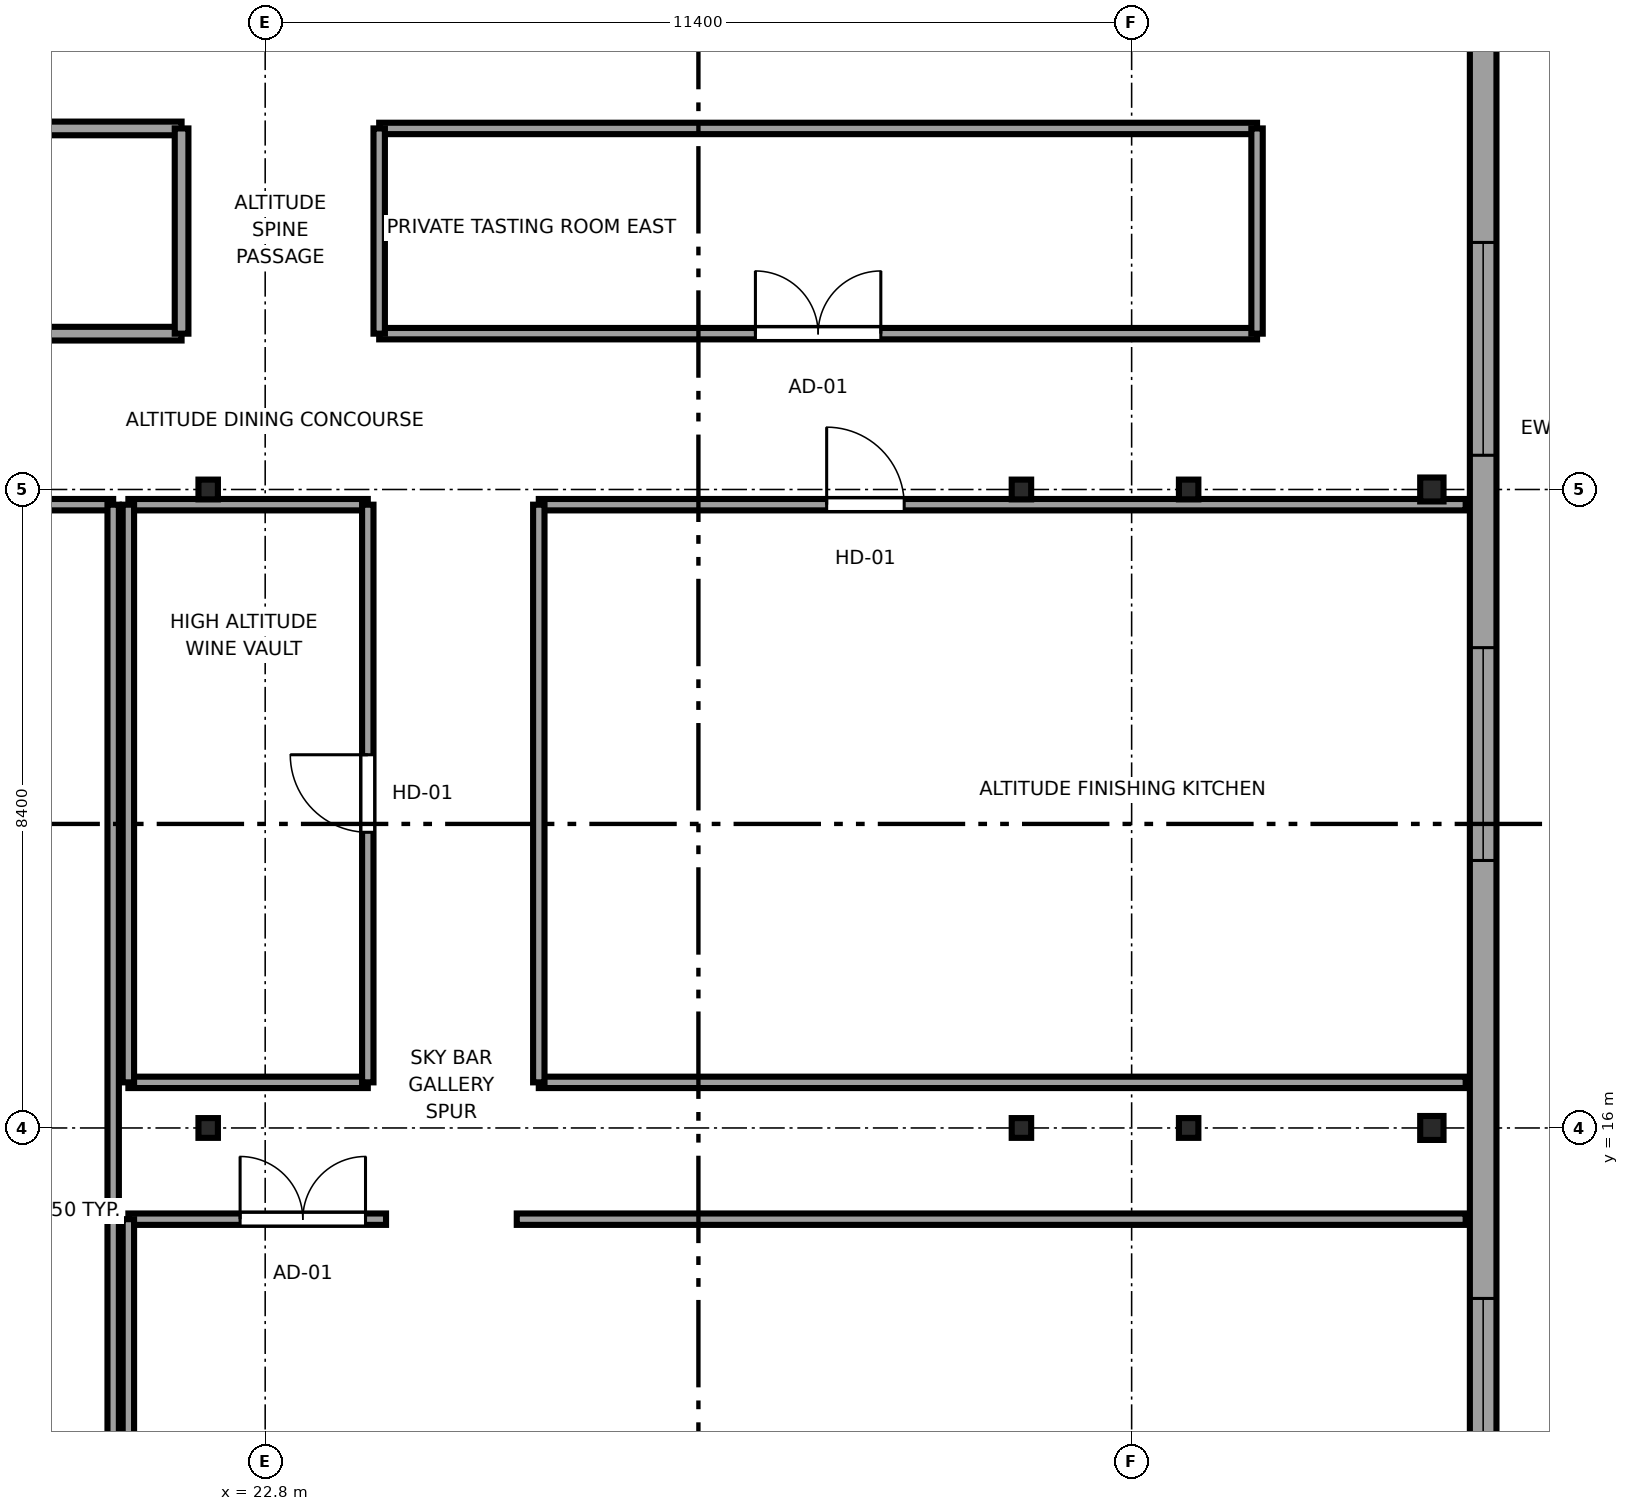
"""IFC4 building model, lengths in metres.
Left out: names, types, materials, properties, quantities, classifications, styles, units other than length and angle.
Written with IfcOpenShell. Run it as: python <this file> out.ifc"""

import sys

from ifc_helpers import new_model, si_unit, direction, frame, frame_2d, origin, origin_2d, place, context, subcontext, project, spatial, rectangle, i_section, extrude, source, transform, mapped, element, fill, save


model = new_model("IFC4")
c1 = context("Model", 3, precision=1e-05, world=origin(), true_north=direction((0.0, 1.0)))
c2 = subcontext(c1, "Body", "Model", "MODEL_VIEW")
j1 = project(units=[si_unit("LENGTHUNIT", "METRE"), si_unit("PLANEANGLEUNIT", "RADIAN")], contexts=[c1])
p1 = place(None, origin())
s1 = spatial("IfcSite", under=j1, at=p1, CompositionType="ELEMENT")
p2 = place(p1, origin())
s2 = spatial("IfcBuilding", under=s1, at=p2, CompositionType="ELEMENT")
p3 = place(p2, frame((0.0, 0.0, 286.55)))
s3 = spatial("IfcBuildingStorey", under=s2, at=p3, CompositionType="ELEMENT", Elevation=286.55)
m1 = source(origin(), c2, "Body", "SweptSolid", [
    extrude(i_section(OverallWidth=0.256, OverallDepth=0.26, WebThickness=0.01, FlangeThickness=0.017, FilletRadius=0.014, at=origin_2d()), origin(), (0.0, 0.0, 1.0), 4.4),
])
for number, where, z_axis, x_axis in (
    (1, (22.05, 16.0, 0.0), (0.0, 0.0, 1.0), (1.0, 0.0, 0.0)),
    (2, (22.05, 24.4, 0.0), (0.0, 0.0, 1.0), (1.0, 0.0, 0.0)),
    (3, (32.75, 16.0, 0.0), (0.0, 0.0, 1.0), (1.0, 0.0, 0.0)),
    (4, (32.75, 24.4, 0.0), (0.0, 0.0, 1.0), (1.0, 0.0, 0.0)),
    (5, (34.95, 16.0, 0.0), (0.0, 0.0, 1.0), (1.0, 0.0, 0.0)),
    (6, (34.95, 24.4, 0.0), (0.0, 0.0, 1.0), (1.0, 0.0, 0.0)),
):
    element("IfcColumn", number, at=place(p3, frame(where, z_axis=z_axis, x_axis=x_axis)), inside=s3, PredefinedType="COLUMN", context=c2, shape_type="MappedRepresentation", body=[
        mapped(m1, transform((0.0, 0.0, 0.0), x_axis=(1.0, 0.0, 0.0), y_axis=(0.0, 1.0, 0.0), z_axis=(0.0, 0.0, 1.0), scale=1.0)),
    ])
m2 = source(origin(), c2, "Body", "SweptSolid", [
    extrude(i_section(OverallWidth=0.307, OverallDepth=0.315, WebThickness=0.012, FlangeThickness=0.019, FilletRadius=0.017, at=origin_2d()), origin(), (0.0, 0.0, 1.0), 4.4),
])
for number, where, z_axis, x_axis in (
    (7, (38.15, 16.0, 0.0), (0.0, 0.0, 1.0), (1.0, 0.0, 0.0)),
    (8, (38.15, 24.4, 0.0), (0.0, 0.0, 1.0), (1.0, 0.0, 0.0)),
):
    element("IfcColumn", number, at=place(p3, frame(where, z_axis=z_axis, x_axis=x_axis)), inside=s3, PredefinedType="COLUMN", context=c2, shape_type="MappedRepresentation", body=[
        mapped(m2, transform((0.0, 0.0, 0.0), x_axis=(1.0, 0.0, 0.0), y_axis=(0.0, 1.0, 0.0), z_axis=(0.0, 0.0, 1.0), scale=1.0)),
    ])
p4 = place(p3, frame((38.825, 9.617, 0.0), z_axis=(0.0, 0.0, 1.0), x_axis=(0.0, 1.0, 0.0)))
e9 = element("IfcWall", 9, at=p4, inside=s3, PredefinedType="SOLIDWALL", context=c2, shape_type="SweptSolid", body=[
    extrude(rectangle(XDim=31.166, YDim=0.35, at=frame_2d((15.583, 0.0))), origin(), (0.0, 0.0, 1.0), 4.14),
])
p5 = place(p4, frame((1.34, 0.0, 0.62)))
e10 = element("IfcOpeningElement", 10, at=p5, cuts=e9, PredefinedType="OPENING", context=c2, shape_type="SweptSolid", body=[
    extrude(rectangle(XDim=2.8, YDim=2.25, at=frame_2d((1.4, 1.125))), frame((0.0, 0.185, 0.0), z_axis=(0.0, -1.0, 0.0), x_axis=(1.0, 0.0, 0.0)), (0.0, 0.0, 1.0), 0.37),
])
p6 = place(p4, frame((9.902, 0.0, 0.62)))
e11 = element("IfcOpeningElement", 11, at=p6, cuts=e9, PredefinedType="OPENING", context=c2, shape_type="SweptSolid", body=[
    extrude(rectangle(XDim=2.8, YDim=2.25, at=frame_2d((1.4, 1.125))), frame((0.0, 0.185, 0.0), z_axis=(0.0, -1.0, 0.0), x_axis=(1.0, 0.0, 0.0)), (0.0, 0.0, 1.0), 0.37),
])
p7 = place(p4, frame((15.233, 0.0, 0.62)))
e12 = element("IfcOpeningElement", 12, at=p7, cuts=e9, PredefinedType="OPENING", context=c2, shape_type="SweptSolid", body=[
    extrude(rectangle(XDim=2.8, YDim=2.25, at=frame_2d((1.4, 1.125))), frame((0.0, 0.185, 0.0), z_axis=(0.0, -1.0, 0.0), x_axis=(1.0, 0.0, 0.0)), (0.0, 0.0, 1.0), 0.37),
])
p8 = place(p4, frame((22.744, 0.0, 0.62)))
e13 = element("IfcOpeningElement", 13, at=p8, cuts=e9, PredefinedType="OPENING", context=c2, shape_type="SweptSolid", body=[
    extrude(rectangle(XDim=2.8, YDim=2.25, at=frame_2d((1.4, 1.125))), frame((0.0, 0.185, 0.0), z_axis=(0.0, -1.0, 0.0), x_axis=(1.0, 0.0, 0.0)), (0.0, 0.0, 1.0), 0.37),
])
p9 = place(p4, frame((27.025, 0.0, 0.62)))
e14 = element("IfcOpeningElement", 14, at=p9, cuts=e9, PredefinedType="OPENING", context=c2, shape_type="SweptSolid", body=[
    extrude(rectangle(XDim=2.8, YDim=2.25, at=frame_2d((1.4, 1.125))), frame((0.0, 0.185, 0.0), z_axis=(0.0, -1.0, 0.0), x_axis=(1.0, 0.0, 0.0)), (0.0, 0.0, 1.0), 0.37),
])
p10 = place(p3, frame((10.0, 26.45, 0.0), z_axis=(0.0, 0.0, 1.0), x_axis=(1.0, 0.0, 0.0)))
e15 = element("IfcWall", 15, at=p10, inside=s3, PredefinedType="PARTITIONING", context=c2, shape_type="SweptSolid", body=[
    extrude(rectangle(XDim=11.7, YDim=0.18, at=frame_2d((5.85, 0.0))), origin(), (0.0, 0.0, 1.0), 4.14),
])
p11 = place(p10, frame((5.025, 0.0, 0.0)))
e16 = element("IfcOpeningElement", 16, at=p11, cuts=e15, PredefinedType="OPENING", context=c2, shape_type="SweptSolid", body=[
    extrude(rectangle(XDim=1.65, YDim=2.15, at=frame_2d((0.825, 1.075))), frame((0.0, 0.1, 0.0), z_axis=(0.0, -1.0, 0.0), x_axis=(1.0, 0.0, 0.0)), (0.0, 0.0, 1.0), 0.2),
])
p12 = place(p3, frame((10.0, 29.15, 0.0), z_axis=(0.0, 0.0, 1.0), x_axis=(1.0, 0.0, 0.0)))
e17 = element("IfcWall", 17, at=p12, inside=s3, PredefinedType="PARTITIONING", context=c2, shape_type="SweptSolid", body=[
    extrude(rectangle(XDim=11.7, YDim=0.18, at=frame_2d((5.85, 0.0))), origin(), (0.0, 0.0, 1.0), 4.14),
])
p13 = place(p3, frame((21.7, 26.45, 0.0), z_axis=(0.0, 0.0, 1.0), x_axis=(0.0, 1.0, 0.0)))
e18 = element("IfcWall", 18, at=p13, inside=s3, PredefinedType="PARTITIONING", context=c2, shape_type="SweptSolid", body=[
    extrude(rectangle(XDim=2.7, YDim=0.18, at=frame_2d((1.35, 0.0))), origin(), (0.0, 0.0, 1.0), 4.14),
])
p14 = place(p3, frame((24.3, 26.45, 0.0), z_axis=(0.0, 0.0, 1.0), x_axis=(1.0, 0.0, 0.0)))
e19 = element("IfcWall", 19, at=p14, inside=s3, PredefinedType="PARTITIONING", context=c2, shape_type="SweptSolid", body=[
    extrude(rectangle(XDim=11.55, YDim=0.15, at=frame_2d((5.775, 0.0))), origin(), (0.0, 0.0, 1.0), 4.14),
])
p15 = place(p14, frame((4.95, 0.0, 0.0)))
e20 = element("IfcOpeningElement", 20, at=p15, cuts=e19, PredefinedType="OPENING", context=c2, shape_type="SweptSolid", body=[
    extrude(rectangle(XDim=1.65, YDim=2.15, at=frame_2d((0.825, 1.075))), frame((0.0, 0.085, 0.0), z_axis=(0.0, -1.0, 0.0), x_axis=(1.0, 0.0, 0.0)), (0.0, 0.0, 1.0), 0.17),
])
p16 = place(p3, frame((24.3, 29.15, 0.0), z_axis=(0.0, 0.0, 1.0), x_axis=(1.0, 0.0, 0.0)))
e21 = element("IfcWall", 21, at=p16, inside=s3, PredefinedType="PARTITIONING", context=c2, shape_type="SweptSolid", body=[
    extrude(rectangle(XDim=11.55, YDim=0.15, at=frame_2d((5.775, 0.0))), origin(), (0.0, 0.0, 1.0), 4.14),
])
for number, where, z_axis, x_axis in (
    (22, (24.3, 26.45, 0.0), (0.0, 0.0, 1.0), (0.0, 1.0, 0.0)),
    (23, (35.85, 26.45, 0.0), (0.0, 0.0, 1.0), (0.0, 1.0, 0.0)),
):
    element("IfcWall", number, at=place(p3, frame(where, z_axis=z_axis, x_axis=x_axis)), inside=s3, PredefinedType="PARTITIONING", context=c2, shape_type="SweptSolid", body=[
        extrude(rectangle(XDim=2.7, YDim=0.15, at=frame_2d((1.35, 0.0))), origin(), (0.0, 0.0, 1.0), 4.14),
    ])
p17 = place(p3, frame((3.005, 24.2, 0.0), z_axis=(0.0, 0.0, 1.0), x_axis=(1.0, 0.0, 0.0)))
e24 = element("IfcWall", 24, at=p17, inside=s3, PredefinedType="PARTITIONING", context=c2, shape_type="SweptSolid", body=[
    extrude(rectangle(XDim=17.795, YDim=0.15, at=frame_2d((8.897, 0.0))), origin(), (0.0, 0.0, 1.0), 2.93),
])
p18 = place(p17, frame((8.073, 0.0, 0.0)))
e25 = element("IfcOpeningElement", 25, at=p18, cuts=e24, PredefinedType="OPENING", context=c2, shape_type="SweptSolid", body=[
    extrude(rectangle(XDim=1.65, YDim=2.15, at=frame_2d((0.825, 1.075))), frame((0.0, 0.085, 0.0), z_axis=(0.0, -1.0, 0.0), x_axis=(1.0, 0.0, 0.0)), (0.0, 0.0, 1.0), 0.17),
])
p19 = place(p3, frame((20.8, 5.605, 0.0), z_axis=(0.0, 0.0, 1.0), x_axis=(0.0, 1.0, 0.0)))
e26 = element("IfcWall", 26, at=p19, inside=s3, PredefinedType="PARTITIONING", context=c2, shape_type="SweptSolid", body=[
    extrude(rectangle(XDim=18.595, YDim=0.15, at=frame_2d((9.297, 0.0))), origin(), (0.0, 0.0, 1.0), 4.14),
])
p20 = place(p3, frame((21.0, 14.8, 0.0), z_axis=(0.0, 0.0, 1.0), x_axis=(1.0, 0.0, 0.0)))
e27 = element("IfcWall", 27, at=p20, inside=s3, PredefinedType="PARTITIONING", context=c2, shape_type="SweptSolid", body=[
    extrude(rectangle(XDim=3.39, YDim=0.15, at=frame_2d((1.695, 0.0))), origin(), (0.0, 0.0, 1.0), 4.14),
])
p21 = place(p20, frame((1.47, 0.0, 0.0)))
e28 = element("IfcOpeningElement", 28, at=p21, cuts=e27, PredefinedType="OPENING", context=c2, shape_type="SweptSolid", body=[
    extrude(rectangle(XDim=1.65, YDim=2.15, at=frame_2d((0.825, 1.075))), frame((0.0, 0.085, 0.0), z_axis=(0.0, -1.0, 0.0), x_axis=(1.0, 0.0, 0.0)), (0.0, 0.0, 1.0), 0.17),
])
p22 = place(p3, frame((26.11, 14.8, 0.0), z_axis=(0.0, 0.0, 1.0), x_axis=(1.0, 0.0, 0.0)))
e29 = element("IfcWall", 29, at=p22, inside=s3, PredefinedType="PARTITIONING", context=c2, shape_type="SweptSolid", body=[
    extrude(rectangle(XDim=12.485, YDim=0.15, at=frame_2d((6.242, 0.0))), origin(), (0.0, 0.0, 1.0), 4.14),
])
p23 = place(p3, frame((21.0, 5.605, 0.0), z_axis=(0.0, 0.0, 1.0), x_axis=(0.0, 1.0, 0.0)))
e30 = element("IfcWall", 30, at=p23, inside=s3, PredefinedType="PARTITIONING", context=c2, shape_type="SweptSolid", body=[
    extrude(rectangle(XDim=9.195, YDim=0.15, at=frame_2d((4.598, 0.0))), origin(), (0.0, 0.0, 1.0), 4.14),
])
p24 = place(p3, frame((26.4, 16.6, 0.0), z_axis=(0.0, 0.0, 1.0), x_axis=(1.0, 0.0, 0.0)))
e31 = element("IfcWall", 31, at=p24, inside=s3, PredefinedType="PARTITIONING", context=c2, shape_type="SweptSolid", body=[
    extrude(rectangle(XDim=12.195, YDim=0.15, at=frame_2d((6.098, 0.0))), origin(), (0.0, 0.0, 1.0), 4.14),
])
p25 = place(p3, frame((26.4, 24.2, 0.0), z_axis=(0.0, 0.0, 1.0), x_axis=(1.0, 0.0, 0.0)))
e32 = element("IfcWall", 32, at=p25, inside=s3, PredefinedType="PARTITIONING", context=c2, shape_type="SweptSolid", body=[
    extrude(rectangle(XDim=12.195, YDim=0.15, at=frame_2d((6.098, 0.0))), origin(), (0.0, 0.0, 1.0), 2.93),
])
p26 = place(p25, frame((3.788, 0.0, 0.0)))
e33 = element("IfcOpeningElement", 33, at=p26, cuts=e32, PredefinedType="OPENING", context=c2, shape_type="SweptSolid", body=[
    extrude(rectangle(XDim=1.02, YDim=2.03, at=frame_2d((0.51, 1.015))), frame((0.0, 0.085, 0.0), z_axis=(0.0, -1.0, 0.0), x_axis=(1.0, 0.0, 0.0)), (0.0, 0.0, 1.0), 0.17),
])
p27 = place(p3, frame((26.4, 16.6, 0.0), z_axis=(0.0, 0.0, 1.0), x_axis=(0.0, 1.0, 0.0)))
e34 = element("IfcWall", 34, at=p27, inside=s3, PredefinedType="PARTITIONING", context=c2, shape_type="SweptSolid", body=[
    extrude(rectangle(XDim=7.6, YDim=0.15, at=frame_2d((3.8, 0.0))), origin(), (0.0, 0.0, 1.0), 4.14),
])
p28 = place(p3, frame((21.0, 16.6, 0.0), z_axis=(0.0, 0.0, 1.0), x_axis=(1.0, 0.0, 0.0)))
e35 = element("IfcWall", 35, at=p28, inside=s3, PredefinedType="PARTITIONING", context=c2, shape_type="SweptSolid", body=[
    extrude(rectangle(XDim=3.15, YDim=0.15, at=frame_2d((1.575, 0.0))), origin(), (0.0, 0.0, 1.0), 4.14),
])
p29 = place(p3, frame((21.0, 24.2, 0.0), z_axis=(0.0, 0.0, 1.0), x_axis=(1.0, 0.0, 0.0)))
e36 = element("IfcWall", 36, at=p29, inside=s3, PredefinedType="PARTITIONING", context=c2, shape_type="SweptSolid", body=[
    extrude(rectangle(XDim=3.15, YDim=0.15, at=frame_2d((1.575, 0.0))), origin(), (0.0, 0.0, 1.0), 2.93),
])
p30 = place(p3, frame((21.0, 16.6, 0.0), z_axis=(0.0, 0.0, 1.0), x_axis=(0.0, 1.0, 0.0)))
e37 = element("IfcWall", 37, at=p30, inside=s3, PredefinedType="PARTITIONING", context=c2, shape_type="SweptSolid", body=[
    extrude(rectangle(XDim=7.6, YDim=0.15, at=frame_2d((3.8, 0.0))), origin(), (0.0, 0.0, 1.0), 4.14),
])
p31 = place(p3, frame((24.15, 16.6, 0.0), z_axis=(0.0, 0.0, 1.0), x_axis=(0.0, 1.0, 0.0)))
e38 = element("IfcWall", 38, at=p31, inside=s3, PredefinedType="PARTITIONING", context=c2, shape_type="SweptSolid", body=[
    extrude(rectangle(XDim=7.6, YDim=0.15, at=frame_2d((3.8, 0.0))), origin(), (0.0, 0.0, 1.0), 4.14),
])
p32 = place(p31, frame((3.29, 0.0, 0.0)))
e39 = element("IfcOpeningElement", 39, at=p32, cuts=e38, PredefinedType="OPENING", context=c2, shape_type="SweptSolid", body=[
    extrude(rectangle(XDim=1.02, YDim=2.03, at=frame_2d((0.51, 1.015))), frame((0.0, 0.085, 0.0), z_axis=(0.0, -1.0, 0.0), x_axis=(1.0, 0.0, 0.0)), (0.0, 0.0, 1.0), 0.17),
])
m3 = source(origin(), c2, "Body", "SweptSolid", [
    extrude(rectangle(XDim=2.8, YDim=2.25, at=frame_2d((1.4, 1.125))), frame((0.0, 0.09, 0.0), z_axis=(0.0, -1.0, 0.0), x_axis=(1.0, 0.0, 0.0)), (0.0, 0.0, 1.0), 0.06),
])
p33 = place(p5, origin())
e40 = element("IfcWindow", 40, at=p33, inside=s3, PartitioningType="TRIPLE_PANEL_HORIZONTAL", PredefinedType="WINDOW", context=c2, shape_type="MappedRepresentation", body=[
    mapped(m3, transform((0.0, 0.0, 0.0), x_axis=(1.0, 0.0, 0.0), y_axis=(0.0, 1.0, 0.0), z_axis=(0.0, 0.0, 1.0), scale=1.0)),
])
fill(e10, e40)
p34 = place(p6, origin())
e41 = element("IfcWindow", 41, at=p34, inside=s3, PartitioningType="TRIPLE_PANEL_HORIZONTAL", PredefinedType="WINDOW", context=c2, shape_type="MappedRepresentation", body=[
    mapped(m3, transform((0.0, 0.0, 0.0), x_axis=(1.0, 0.0, 0.0), y_axis=(0.0, 1.0, 0.0), z_axis=(0.0, 0.0, 1.0), scale=1.0)),
])
fill(e11, e41)
p35 = place(p7, origin())
e42 = element("IfcWindow", 42, at=p35, inside=s3, PartitioningType="TRIPLE_PANEL_HORIZONTAL", PredefinedType="WINDOW", context=c2, shape_type="MappedRepresentation", body=[
    mapped(m3, transform((0.0, 0.0, 0.0), x_axis=(1.0, 0.0, 0.0), y_axis=(0.0, 1.0, 0.0), z_axis=(0.0, 0.0, 1.0), scale=1.0)),
])
fill(e12, e42)
m4 = source(origin(), c2, "Body", "SweptSolid", [
    extrude(rectangle(XDim=1.65, YDim=2.15, at=frame_2d((0.825, 1.075))), frame((0.0, 0.025, 0.0), z_axis=(0.0, -1.0, 0.0), x_axis=(1.0, 0.0, 0.0)), (0.0, 0.0, 1.0), 0.05),
])
p36 = place(p15, origin())
e43 = element("IfcDoor", 43, at=p36, inside=s3, OperationType="DOUBLE_DOOR_SINGLE_SWING", PredefinedType="DOOR", context=c2, shape_type="MappedRepresentation", body=[
    mapped(m4, transform((0.0, 0.0, 0.0), x_axis=(1.0, 0.0, 0.0), y_axis=(0.0, 1.0, 0.0), z_axis=(0.0, 0.0, 1.0), scale=1.0)),
])
fill(e20, e43)
p37 = place(p21, origin())
e44 = element("IfcDoor", 44, at=p37, inside=s3, OperationType="DOUBLE_DOOR_SINGLE_SWING", PredefinedType="DOOR", context=c2, shape_type="MappedRepresentation", body=[
    mapped(m4, transform((0.0, 0.0, 0.0), x_axis=(1.0, 0.0, 0.0), y_axis=(0.0, 1.0, 0.0), z_axis=(0.0, 0.0, 1.0), scale=1.0)),
])
fill(e28, e44)
m5 = source(origin(), c2, "Body", "SweptSolid", [
    extrude(rectangle(XDim=1.02, YDim=2.03, at=frame_2d((0.51, 1.015))), frame((0.0, 0.025, 0.0), z_axis=(0.0, -1.0, 0.0), x_axis=(1.0, 0.0, 0.0)), (0.0, 0.0, 1.0), 0.05),
])
p38 = place(p26, origin())
e45 = element("IfcDoor", 45, at=p38, inside=s3, OperationType="SINGLE_SWING_LEFT", PredefinedType="DOOR", context=c2, shape_type="MappedRepresentation", body=[
    mapped(m5, transform((0.0, 0.0, 0.0), x_axis=(1.0, 0.0, 0.0), y_axis=(0.0, 1.0, 0.0), z_axis=(0.0, 0.0, 1.0), scale=1.0)),
])
fill(e33, e45)
p39 = place(p32, origin())
e46 = element("IfcDoor", 46, at=p39, inside=s3, OperationType="SINGLE_SWING_RIGHT", PredefinedType="DOOR", context=c2, shape_type="MappedRepresentation", body=[
    mapped(m5, transform((0.0, 0.0, 0.0), x_axis=(1.0, 0.0, 0.0), y_axis=(0.0, 1.0, 0.0), z_axis=(0.0, 0.0, 1.0), scale=1.0)),
])
fill(e39, e46)
save(model, sys.argv[1])
